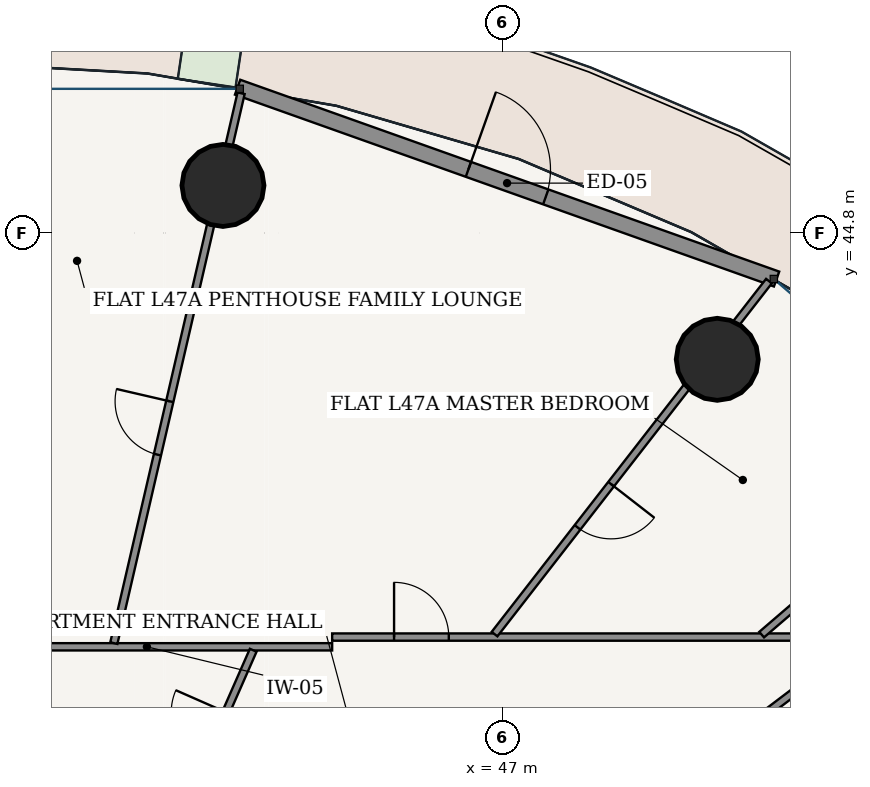
"""IFC4 building model, lengths in metres.
Left out: names, types, materials, properties, quantities, classifications, styles, units other than length and angle.
Written with IfcOpenShell. Run it as: python <this file> out.ifc"""

import sys

from ifc_helpers import new_model, si_unit, direction, frame, frame_2d, origin, origin_2d, place, context, subcontext, project, spatial, rectangle, hollow_circle, extrude, source, transform, mapped, element, fill, save


model = new_model("IFC4")
c1 = context("Model", 3, precision=1e-05, world=origin(), true_north=direction((-0.2419218956, 0.970295726276)))
c2 = subcontext(c1, "Body", "Model", "MODEL_VIEW")
j1 = project(units=[si_unit("LENGTHUNIT", "METRE"), si_unit("PLANEANGLEUNIT", "RADIAN")], contexts=[c1])
p1 = place(None, origin())
s1 = spatial("IfcSite", under=j1, at=p1, CompositionType="ELEMENT")
p2 = place(p1, origin())
s2 = spatial("IfcBuilding", under=s1, at=p2, CompositionType="ELEMENT")
p3 = place(p2, frame((0.0, 0.0, 178.6)))
s3 = spatial("IfcBuildingStorey", under=s2, at=p3, CompositionType="ELEMENT", Elevation=178.6)
for number, where, z_axis, x_axis in (
    (1, (50.528, 42.723, 0.0), (0.0, 0.0, 1.0), (1.0, 0.0, 0.0)),
    (2, (42.399, 45.582, 0.0), (0.0, 0.0, 1.0), (1.0, 0.0, 0.0)),
):
    element("IfcColumn", number, at=place(p3, frame(where, z_axis=z_axis, x_axis=x_axis)), inside=s3, PredefinedType="COLUMN", context=c2, shape_type="SweptSolid", body=[
        extrude(hollow_circle(Radius=0.675, WallThickness=0.042, at=origin_2d()), origin(), (0.0, 0.0, 1.0), 3.6),
    ])
p4 = place(p3, frame((51.503, 44.043, 0.0), z_axis=(0.0, 0.0, 1.0), x_axis=(-0.942095406405, 0.335344964522, 0.0)))
e3 = element("IfcWall", 3, at=p4, inside=s3, PredefinedType="SOLIDWALL", context=c2, shape_type="SweptSolid", body=[
    extrude(rectangle(XDim=9.408, YDim=0.26, at=frame_2d((4.704, 0.0))), origin(), (0.0, 0.0, 1.0), 3.33),
])
p5 = place(p4, frame((4.029, 0.0, 0.0)))
e4 = element("IfcOpeningElement", 4, at=p5, cuts=e3, PredefinedType="OPENING", context=c2, shape_type="SweptSolid", body=[
    extrude(rectangle(XDim=1.35, YDim=2.2, at=frame_2d((0.675, 1.1))), frame((0.0, 0.14, 0.0), z_axis=(0.0, -1.0, 0.0), x_axis=(1.0, 0.0, 0.0)), (0.0, 0.0, 1.0), 0.28),
])
p6 = place(p3, frame((38.102, 37.995, 0.0), z_axis=(0.0, 0.0, 1.0), x_axis=(1.0, 0.0, 0.0)))
e5 = element("IfcWall", 5, at=p6, inside=s3, PredefinedType="PARTITIONING", context=c2, shape_type="SweptSolid", body=[
    extrude(rectangle(XDim=6.093, YDim=0.12, at=frame_2d((3.046, 0.0))), origin(), (0.0, 0.0, 1.0), 2.776),
])
p7 = place(p3, frame((44.195, 38.155, 0.0), z_axis=(0.0, 0.0, 1.0), x_axis=(1.0, 0.0, 0.0)))
e6 = element("IfcWall", 6, at=p7, inside=s3, PredefinedType="PARTITIONING", context=c2, shape_type="SweptSolid", body=[
    extrude(rectangle(XDim=8.01, YDim=0.12, at=frame_2d((4.005, 0.0))), origin(), (0.0, 0.0, 1.0), 2.776),
])
p8 = place(p7, frame((1.018, 0.0, 0.0)))
e7 = element("IfcOpeningElement", 7, at=p8, cuts=e6, PredefinedType="OPENING", context=c2, shape_type="SweptSolid", body=[
    extrude(rectangle(XDim=0.9, YDim=2.15, at=frame_2d((0.45, 1.075))), frame((0.0, 0.07, 0.0), z_axis=(0.0, -1.0, 0.0), x_axis=(1.0, 0.0, 0.0)), (0.0, 0.0, 1.0), 0.14),
])
p9 = place(p3, frame((51.258, 38.195, 0.0), z_axis=(0.0, 0.0, 1.0), x_axis=(0.758369880373, 0.651824458381, 0.0)))
e8 = element("IfcWall", 8, at=p9, inside=s3, PredefinedType="PARTITIONING", context=c2, shape_type="SweptSolid", body=[
    extrude(rectangle(XDim=5.018, YDim=0.12, at=frame_2d((2.509, 0.0))), origin(), (0.0, 0.0, 1.0), 2.846),
])
p10 = place(p9, frame((2.059, 0.0, 0.0)))
e9 = element("IfcOpeningElement", 9, at=p10, cuts=e8, PredefinedType="OPENING", context=c2, shape_type="SweptSolid", body=[
    extrude(rectangle(XDim=0.9, YDim=2.15, at=frame_2d((0.45, 1.075))), frame((0.0, 0.07, 0.0), z_axis=(0.0, -1.0, 0.0), x_axis=(1.0, 0.0, 0.0)), (0.0, 0.0, 1.0), 0.14),
])
p11 = place(p3, frame((46.865, 38.204, 0.0), z_axis=(0.0, 0.0, 1.0), x_axis=(0.613754405153, 0.789497010859, 0.0)))
e10 = element("IfcWall", 10, at=p11, inside=s3, PredefinedType="PARTITIONING", context=c2, shape_type="SweptSolid", body=[
    extrude(rectangle(XDim=7.353, YDim=0.12, at=frame_2d((3.677, 0.0))), origin(), (0.0, 0.0, 1.0), 2.776),
])
p12 = place(p11, frame((2.224, 0.0, 0.0)))
e11 = element("IfcOpeningElement", 11, at=p12, cuts=e10, PredefinedType="OPENING", context=c2, shape_type="SweptSolid", body=[
    extrude(rectangle(XDim=0.9, YDim=2.15, at=frame_2d((0.45, 1.075))), frame((0.0, 0.07, 0.0), z_axis=(0.0, -1.0, 0.0), x_axis=(1.0, 0.0, 0.0)), (0.0, 0.0, 1.0), 0.14),
])
p13 = place(p3, frame((40.605, 38.055, 0.0), z_axis=(0.0, 0.0, 1.0), x_axis=(0.225466493239, 0.974250922723, 0.0)))
e12 = element("IfcWall", 12, at=p13, inside=s3, PredefinedType="PARTITIONING", context=c2, shape_type="SweptSolid", body=[
    extrude(rectangle(XDim=9.282, YDim=0.12, at=frame_2d((4.641, 0.0))), origin(), (0.0, 0.0, 1.0), 2.776),
])
p14 = place(p13, frame((3.182, 0.0, 0.0)))
e13 = element("IfcOpeningElement", 13, at=p14, cuts=e12, PredefinedType="OPENING", context=c2, shape_type="SweptSolid", body=[
    extrude(rectangle(XDim=0.9, YDim=2.15, at=frame_2d((0.45, 1.075))), frame((0.0, 0.07, 0.0), z_axis=(0.0, -1.0, 0.0), x_axis=(1.0, 0.0, 0.0)), (0.0, 0.0, 1.0), 0.14),
])
p15 = place(p3, frame((49.133, 35.236, 0.0), z_axis=(0.0, 0.0, 1.0), x_axis=(0.797054583929, 0.603907269568, 0.0)))
e14 = element("IfcWall", 14, at=p15, inside=s3, PredefinedType="PARTITIONING", context=c2, shape_type="SweptSolid", body=[
    extrude(rectangle(XDim=3.792, YDim=0.12, at=frame_2d((1.896, 0.0))), origin(), (0.0, 0.0, 1.0), 3.005),
])
p16 = place(p15, frame((1.466, 0.0, 0.0)))
e15 = element("IfcOpeningElement", 15, at=p16, cuts=e14, PredefinedType="OPENING", context=c2, shape_type="SweptSolid", body=[
    extrude(rectangle(XDim=0.86, YDim=2.15, at=frame_2d((0.43, 1.075))), frame((0.0, 0.07, 0.0), z_axis=(0.0, -1.0, 0.0), x_axis=(1.0, 0.0, 0.0)), (0.0, 0.0, 1.0), 0.14),
])
p17 = place(p3, frame((41.638, 35.075, 0.0), z_axis=(0.0, 0.0, 1.0), x_axis=(0.402456087228, 0.915439292282, 0.0)))
e16 = element("IfcWall", 16, at=p17, inside=s3, PredefinedType="PARTITIONING", context=c2, shape_type="SweptSolid", body=[
    extrude(rectangle(XDim=3.128, YDim=0.12, at=frame_2d((1.564, 0.0))), origin(), (0.0, 0.0, 1.0), 3.33),
])
p18 = place(p17, frame((1.114, 0.0, 0.0)))
e17 = element("IfcOpeningElement", 17, at=p18, cuts=e16, PredefinedType="OPENING", context=c2, shape_type="SweptSolid", body=[
    extrude(rectangle(XDim=0.9, YDim=2.15, at=frame_2d((0.45, 1.075))), frame((0.0, 0.07, 0.0), z_axis=(0.0, -1.0, 0.0), x_axis=(1.0, 0.0, 0.0)), (0.0, 0.0, 1.0), 0.14),
])
m1 = source(origin(), c2, "Body", "SweptSolid", [
    extrude(rectangle(XDim=1.35, YDim=2.2, at=frame_2d((0.675, 1.1))), frame((0.0, 0.025, 0.0), z_axis=(0.0, -1.0, 0.0), x_axis=(1.0, 0.0, 0.0)), (0.0, 0.0, 1.0), 0.05),
])
p19 = place(p5, frame((1.35, 0.0, 0.0), z_axis=(0.0, 0.0, 1.0), x_axis=(-1.0, 0.0, 0.0)))
e18 = element("IfcDoor", 18, at=p19, inside=s3, OperationType="SINGLE_SWING_LEFT", PredefinedType="DOOR", context=c2, shape_type="MappedRepresentation", body=[
    mapped(m1, transform((0.0, 0.0, 0.0), scale=1.0)),
])
fill(e4, e18)
m2 = source(origin(), c2, "Body", "SweptSolid", [
    extrude(rectangle(XDim=0.9, YDim=2.15, at=frame_2d((0.45, 1.075))), frame((0.0, 0.025, 0.0), z_axis=(0.0, -1.0, 0.0), x_axis=(1.0, 0.0, 0.0)), (0.0, 0.0, 1.0), 0.05),
])
p20 = place(p8, origin())
e19 = element("IfcDoor", 19, at=p20, inside=s3, OperationType="SINGLE_SWING_LEFT", PredefinedType="DOOR", context=c2, shape_type="MappedRepresentation", body=[
    mapped(m2, transform((0.0, 0.0, 0.0), scale=1.0)),
])
fill(e7, e19)
p21 = place(p14, origin())
e20 = element("IfcDoor", 20, at=p21, inside=s3, OperationType="SINGLE_SWING_RIGHT", PredefinedType="DOOR", context=c2, shape_type="MappedRepresentation", body=[
    mapped(m2, transform((0.0, 0.0, 0.0), scale=1.0)),
])
fill(e13, e20)
p22 = place(p12, frame((0.9, 0.0, 0.0), z_axis=(0.0, 0.0, 1.0), x_axis=(-1.0, 0.0, 0.0)))
e21 = element("IfcDoor", 21, at=p22, inside=s3, OperationType="SINGLE_SWING_LEFT", PredefinedType="DOOR", context=c2, shape_type="MappedRepresentation", body=[
    mapped(m2, transform((0.0, 0.0, 0.0), scale=1.0)),
])
fill(e11, e21)
save(model, sys.argv[1])
